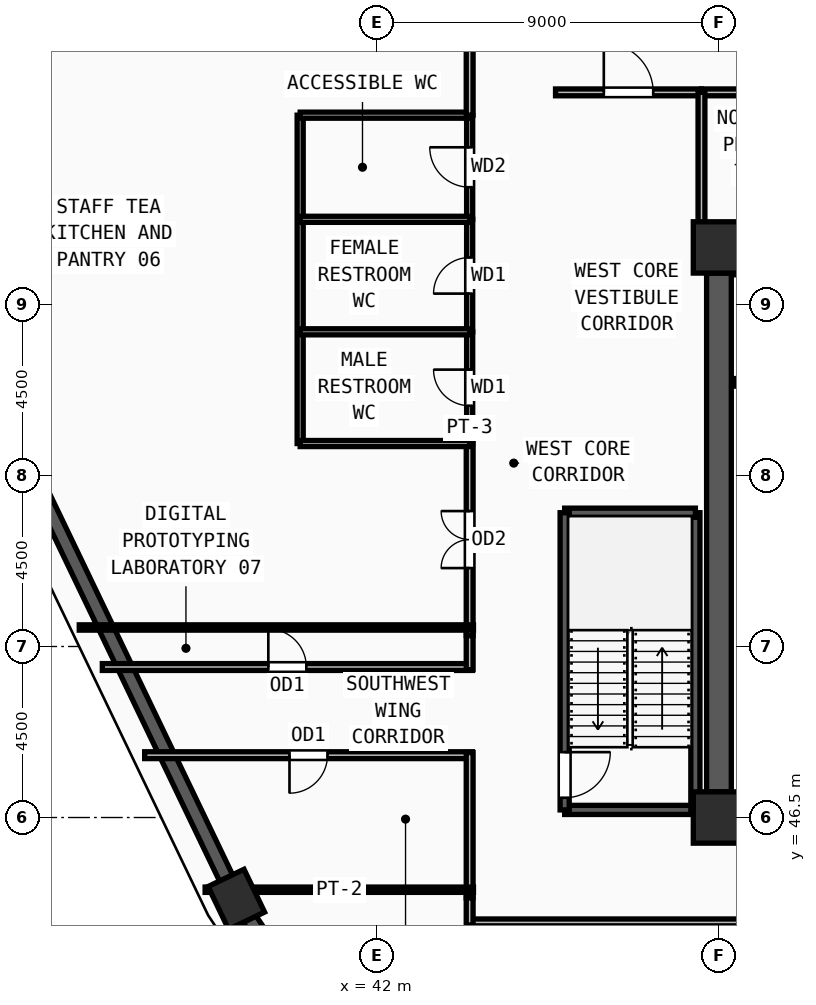
"""IFC4 building model, lengths in metres.
Left out: names, types, materials, properties, quantities, classifications, styles, units other than length and angle.
Written with IfcOpenShell. Run it as: python <this file> out.ifc"""

import sys

from ifc_helpers import new_model, si_unit, direction, frame, frame_2d, origin, origin_2d, place, context, subcontext, project, spatial, rectangle, extrude, source, transform, mapped, element, fill, save


model = new_model("IFC4")
c1 = context("Model", 3, precision=1e-05, world=origin(), true_north=direction((0.0, 1.0)))
c2 = subcontext(c1, "Body", "Model", "MODEL_VIEW")
j1 = project(units=[si_unit("LENGTHUNIT", "METRE"), si_unit("PLANEANGLEUNIT", "RADIAN")], contexts=[c1])
p1 = place(None, origin())
s1 = spatial("IfcSite", under=j1, at=p1, CompositionType="ELEMENT")
p2 = place(p1, origin())
s2 = spatial("IfcBuilding", under=s1, at=p2, CompositionType="ELEMENT")
p3 = place(p2, frame((0.0, 0.0, 236.25)))
s3 = spatial("IfcBuildingStorey", under=s2, at=p3, CompositionType="ELEMENT", Elevation=236.25)
m1 = source(origin(), c2, "Body", "SweptSolid", [
    extrude(rectangle(XDim=1.35, YDim=1.35, at=origin_2d()), origin(), (0.0, 0.0, 1.0), 3.75),
])
for number, where, z_axis, x_axis in (
    (1, (51.0, 46.5, 0.0), (0.0, 0.0, 1.0), (1.0, 0.0, 0.0)),
    (2, (51.0, 61.5, 0.0), (0.0, 0.0, 1.0), (1.0, 0.0, 0.0)),
):
    element("IfcColumn", number, at=place(p3, frame(where, z_axis=z_axis, x_axis=x_axis)), inside=s3, PredefinedType="COLUMN", context=c2, shape_type="MappedRepresentation", body=[
        mapped(m1, transform((0.0, 0.0, 0.0), x_axis=(1.0, 0.0, 0.0), y_axis=(0.0, 1.0, 0.0), z_axis=(0.0, 0.0, 1.0), scale=1.0)),
    ])
m2 = source(origin(), c2, "Body", "SweptSolid", [
    extrude(rectangle(XDim=1.25, YDim=1.05, at=origin_2d()), origin(), (0.0, 0.0, 1.0), 3.75),
])
p4 = place(p3, frame((38.3, 44.347, 0.0), z_axis=(0.0, 0.0, 1.0), x_axis=(-0.43271524133, 0.9015306539, 0.0)))
e3 = element("IfcColumn", 3, at=p4, inside=s3, PredefinedType="COLUMN", context=c2, shape_type="MappedRepresentation", body=[
    mapped(m2, transform((0.0, 0.0, 0.0), x_axis=(1.0, 0.0, 0.0), y_axis=(0.0, 1.0, 0.0), z_axis=(0.0, 0.0, 1.0), scale=1.0)),
])
p5 = place(p3, frame((27.893, 66.025, 0.0), z_axis=(0.0, 0.0, 1.0), x_axis=(0.432777471902, -0.901500781926, 0.0)))
e4 = element("IfcWall", 4, at=p5, inside=s3, PredefinedType="SOLIDWALL", context=c2, shape_type="SweptSolid", body=[
    extrude(rectangle(XDim=23.432, YDim=0.38, at=frame_2d((11.716, 0.0))), origin(), (0.0, 0.0, 1.0), 3.57),
])
m3 = source(origin(), c2, "Body", "SweptSolid", [
    extrude(rectangle(XDim=1.5, YDim=1.9, at=frame_2d((0.75, 0.95))), frame((0.0, 0.2, 0.0), z_axis=(0.0, -1.0, 0.0), x_axis=(1.0, 0.0, 0.0)), (0.0, 0.0, 1.0), 0.4),
])
p6 = place(p5, frame((5.108, 0.0, 0.55)))
e5 = element("IfcOpeningElement", 5, at=p6, cuts=e4, PredefinedType="OPENING", context=c2, shape_type="MappedRepresentation", body=[
    mapped(m3, transform((0.0, 0.0, 0.0), x_axis=(1.0, 0.0, 0.0), y_axis=(0.0, 1.0, 0.0), z_axis=(0.0, 0.0, 1.0), scale=1.0)),
])
p7 = place(p5, frame((10.966, 0.0, 0.55)))
e6 = element("IfcOpeningElement", 6, at=p7, cuts=e4, PredefinedType="OPENING", context=c2, shape_type="MappedRepresentation", body=[
    mapped(m3, transform((0.0, 0.0, 0.0), x_axis=(1.0, 0.0, 0.0), y_axis=(0.0, 1.0, 0.0), z_axis=(0.0, 0.0, 1.0), scale=1.0)),
])
p8 = place(p3, frame((38.641, 43.835, 0.0), z_axis=(0.0, 0.0, 1.0), x_axis=(0.553942197413, -0.83255512846, 0.0)))
e7 = element("IfcWall", 7, at=p8, inside=s3, PredefinedType="SOLIDWALL", context=c2, shape_type="SweptSolid", body=[
    extrude(rectangle(XDim=28.402, YDim=0.38, at=frame_2d((14.201, 0.0))), origin(), (0.0, 0.0, 1.0), 3.57),
])
p9 = place(p8, frame((6.35, 0.0, 0.55)))
e8 = element("IfcOpeningElement", 8, at=p9, cuts=e7, PredefinedType="OPENING", context=c2, shape_type="MappedRepresentation", body=[
    mapped(m3, transform((0.0, 0.0, 0.0), x_axis=(1.0, 0.0, 0.0), y_axis=(0.0, 1.0, 0.0), z_axis=(0.0, 0.0, 1.0), scale=1.0)),
])
p10 = place(p8, frame((13.451, 0.0, 0.55)))
e9 = element("IfcOpeningElement", 9, at=p10, cuts=e7, PredefinedType="OPENING", context=c2, shape_type="MappedRepresentation", body=[
    mapped(m3, transform((0.0, 0.0, 0.0), x_axis=(1.0, 0.0, 0.0), y_axis=(0.0, 1.0, 0.0), z_axis=(0.0, 0.0, 1.0), scale=1.0)),
])
p11 = place(p8, frame((20.551, 0.0, 0.55)))
e10 = element("IfcOpeningElement", 10, at=p11, cuts=e7, PredefinedType="OPENING", context=c2, shape_type="MappedRepresentation", body=[
    mapped(m3, transform((0.0, 0.0, 0.0), x_axis=(1.0, 0.0, 0.0), y_axis=(0.0, 1.0, 0.0), z_axis=(0.0, 0.0, 1.0), scale=1.0)),
])
p12 = place(p3, frame((51.0, 47.175, 0.0), z_axis=(0.0, 0.0, 1.0), x_axis=(0.0, 1.0, 0.0)))
e11 = element("IfcWall", 11, at=p12, inside=s3, PredefinedType="SHEAR", context=c2, shape_type="SweptSolid", body=[
    extrude(rectangle(XDim=13.65, YDim=0.65, at=frame_2d((6.825, 0.0))), origin(), (0.0, 0.0, 1.0), 3.57),
])
p13 = place(p3, frame((46.94, 46.7, 0.0), z_axis=(0.0, 0.0, 1.0), x_axis=(1.0, 0.0, 0.0)))
e12 = element("IfcWall", 12, at=p13, inside=s3, PredefinedType="SOLIDWALL", context=c2, shape_type="SweptSolid", body=[
    extrude(rectangle(XDim=3.44, YDim=0.24, at=frame_2d((1.72, 0.0))), origin(), (0.0, 0.0, 1.0), 3.57),
])
p14 = place(p3, frame((50.38, 46.7, 0.0), z_axis=(0.0, 0.0, 1.0), x_axis=(0.0, 1.0, 0.0)))
e13 = element("IfcWall", 13, at=p14, inside=s3, PredefinedType="SOLIDWALL", context=c2, shape_type="SweptSolid", body=[
    extrude(rectangle(XDim=7.82, YDim=0.24, at=frame_2d((3.91, 0.0))), origin(), (0.0, 0.0, 1.0), 3.57),
])
p15 = place(p3, frame((50.38, 54.52, 0.0), z_axis=(0.0, 0.0, 1.0), x_axis=(-1.0, 0.0, 0.0)))
e14 = element("IfcWall", 14, at=p15, inside=s3, PredefinedType="SOLIDWALL", context=c2, shape_type="SweptSolid", body=[
    extrude(rectangle(XDim=3.44, YDim=0.24, at=frame_2d((1.72, 0.0))), origin(), (0.0, 0.0, 1.0), 3.57),
])
p16 = place(p3, frame((46.94, 54.52, 0.0), z_axis=(0.0, 0.0, 1.0), x_axis=(0.0, -1.0, 0.0)))
e15 = element("IfcWall", 15, at=p16, inside=s3, PredefinedType="SOLIDWALL", context=c2, shape_type="SweptSolid", body=[
    extrude(rectangle(XDim=7.82, YDim=0.24, at=frame_2d((3.91, 0.0))), origin(), (0.0, 0.0, 1.0), 3.57),
])
m4 = source(origin(), c2, "Body", "SweptSolid", [
    extrude(rectangle(XDim=1.2, YDim=2.2, at=frame_2d((0.6, 1.1))), frame((0.0, 0.13, 0.0), z_axis=(0.0, -1.0, 0.0), x_axis=(1.0, 0.0, 0.0)), (0.0, 0.0, 1.0), 0.26),
])
p17 = place(p16, frame((6.3, 0.0, 0.0)))
e16 = element("IfcOpeningElement", 16, at=p17, cuts=e15, PredefinedType="OPENING", context=c2, shape_type="MappedRepresentation", body=[
    mapped(m4, transform((0.0, 0.0, 0.0), x_axis=(1.0, 0.0, 0.0), y_axis=(0.0, 1.0, 0.0), z_axis=(0.0, 0.0, 1.0), scale=1.0)),
])
for number, where, z_axis, x_axis in (
    (17, (51.4, 57.95, 0.0), (0.0, 0.0, 1.0), (1.0, 0.0, 0.0)),
    (18, (53.8, 60.88, 0.0), (0.0, 0.0, 1.0), (-1.0, 0.0, 0.0)),
):
    element("IfcWall", number, at=place(p3, frame(where, z_axis=z_axis, x_axis=x_axis)), inside=s3, PredefinedType="SOLIDWALL", context=c2, shape_type="SweptSolid", body=[
        extrude(rectangle(XDim=2.4, YDim=0.2, at=frame_2d((1.2, 0.0))), origin(), (0.0, 0.0, 1.0), 3.57),
    ])
p18 = place(p3, frame((44.44, 56.34, 0.0), z_axis=(0.0, 0.0, 1.0), x_axis=(0.0, 1.0, 0.0)))
e19 = element("IfcWall", 19, at=p18, inside=s3, PredefinedType="PARTITIONING", context=c2, shape_type="SweptSolid", body=[
    extrude(rectangle(XDim=2.94, YDim=0.16, at=frame_2d((1.47, 0.0))), origin(), (0.0, 0.0, 1.0), 3.57),
])
m5 = source(origin(), c2, "Body", "SweptSolid", [
    extrude(rectangle(XDim=0.95, YDim=2.15, at=frame_2d((0.475, 1.075))), frame((0.0, 0.09, 0.0), z_axis=(0.0, -1.0, 0.0), x_axis=(1.0, 0.0, 0.0)), (0.0, 0.0, 1.0), 0.18),
])
p19 = place(p18, frame((0.995, 0.0, 0.0)))
e20 = element("IfcOpeningElement", 20, at=p19, cuts=e19, PredefinedType="OPENING", context=c2, shape_type="MappedRepresentation", body=[
    mapped(m5, transform((0.0, 0.0, 0.0), x_axis=(1.0, 0.0, 0.0), y_axis=(0.0, 1.0, 0.0), z_axis=(0.0, 0.0, 1.0), scale=1.0)),
])
p20 = place(p3, frame((44.44, 59.28, 0.0), z_axis=(0.0, 0.0, 1.0), x_axis=(0.0, 1.0, 0.0)))
e21 = element("IfcWall", 21, at=p20, inside=s3, PredefinedType="PARTITIONING", context=c2, shape_type="SweptSolid", body=[
    extrude(rectangle(XDim=2.96, YDim=0.16, at=frame_2d((1.48, 0.0))), origin(), (0.0, 0.0, 1.0), 3.57),
])
p21 = place(p20, frame((1.005, 0.0, 0.0)))
e22 = element("IfcOpeningElement", 22, at=p21, cuts=e21, PredefinedType="OPENING", context=c2, shape_type="MappedRepresentation", body=[
    mapped(m5, transform((0.0, 0.0, 0.0), x_axis=(1.0, 0.0, 0.0), y_axis=(0.0, 1.0, 0.0), z_axis=(0.0, 0.0, 1.0), scale=1.0)),
])
p22 = place(p3, frame((44.44, 62.24, 0.0), z_axis=(0.0, 0.0, 1.0), x_axis=(0.0, 1.0, 0.0)))
e23 = element("IfcWall", 23, at=p22, inside=s3, PredefinedType="PARTITIONING", context=c2, shape_type="SweptSolid", body=[
    extrude(rectangle(XDim=2.74, YDim=0.16, at=frame_2d((1.37, 0.0))), origin(), (0.0, 0.0, 1.0), 3.57),
])
m6 = source(origin(), c2, "Body", "SweptSolid", [
    extrude(rectangle(XDim=1.05, YDim=2.15, at=frame_2d((0.525, 1.075))), frame((0.0, 0.09, 0.0), z_axis=(0.0, -1.0, 0.0), x_axis=(1.0, 0.0, 0.0)), (0.0, 0.0, 1.0), 0.18),
])
p23 = place(p22, frame((0.845, 0.0, 0.0)))
e24 = element("IfcOpeningElement", 24, at=p23, cuts=e23, PredefinedType="OPENING", context=c2, shape_type="MappedRepresentation", body=[
    mapped(m6, transform((0.0, 0.0, 0.0), x_axis=(1.0, 0.0, 0.0), y_axis=(0.0, 1.0, 0.0), z_axis=(0.0, 0.0, 1.0), scale=1.0)),
])
p24 = place(p3, frame((50.54, 65.58, 0.0), z_axis=(0.0, 0.0, 1.0), x_axis=(1.0, 0.0, 0.0)))
e25 = element("IfcWall", 25, at=p24, inside=s3, PredefinedType="PARTITIONING", context=c2, shape_type="SweptSolid", body=[
    extrude(rectangle(XDim=3.87, YDim=0.18, at=frame_2d((1.935, 0.0))), origin(), (0.0, 0.0, 1.0), 3.57),
])
m7 = source(origin(), c2, "Body", "SweptSolid", [
    extrude(rectangle(XDim=1.0, YDim=2.2, at=frame_2d((0.5, 1.1))), frame((0.0, 0.1, 0.0), z_axis=(0.0, -1.0, 0.0), x_axis=(1.0, 0.0, 0.0)), (0.0, 0.0, 1.0), 0.2),
])
p25 = place(p24, frame((1.435, 0.0, 0.0)))
e26 = element("IfcOpeningElement", 26, at=p25, cuts=e25, PredefinedType="OPENING", context=c2, shape_type="MappedRepresentation", body=[
    mapped(m7, transform((0.0, 0.0, 0.0), x_axis=(1.0, 0.0, 0.0), y_axis=(0.0, 1.0, 0.0), z_axis=(0.0, 0.0, 1.0), scale=1.0)),
])
p26 = place(p3, frame((46.7, 65.58, 0.0), z_axis=(0.0, 0.0, 1.0), x_axis=(1.0, 0.0, 0.0)))
e27 = element("IfcWall", 27, at=p26, inside=s3, PredefinedType="PARTITIONING", context=c2, shape_type="SweptSolid", body=[
    extrude(rectangle(XDim=3.84, YDim=0.18, at=frame_2d((1.92, 0.0))), origin(), (0.0, 0.0, 1.0), 3.57),
])
m8 = source(origin(), c2, "Body", "SweptSolid", [
    extrude(rectangle(XDim=1.3, YDim=2.2, at=frame_2d((0.65, 1.1))), frame((0.0, 0.1, 0.0), z_axis=(0.0, -1.0, 0.0), x_axis=(1.0, 0.0, 0.0)), (0.0, 0.0, 1.0), 0.2),
])
p27 = place(p26, frame((1.27, 0.0, 0.0)))
e28 = element("IfcOpeningElement", 28, at=p27, cuts=e27, PredefinedType="OPENING", context=c2, shape_type="MappedRepresentation", body=[
    mapped(m8, transform((0.0, 0.0, 0.0), x_axis=(1.0, 0.0, 0.0), y_axis=(0.0, 1.0, 0.0), z_axis=(0.0, 0.0, 1.0), scale=1.0)),
])
p28 = place(p3, frame((44.44, 51.285, 0.0), z_axis=(0.0, 0.0, 1.0), x_axis=(0.0, 1.0, 0.0)))
e29 = element("IfcWall", 29, at=p28, inside=s3, PredefinedType="PARTITIONING", context=c2, shape_type="SweptSolid", body=[
    extrude(rectangle(XDim=5.055, YDim=0.18, at=frame_2d((2.528, 0.0))), origin(), (0.0, 0.0, 1.0), 3.57),
])
m9 = source(origin(), c2, "Body", "SweptSolid", [
    extrude(rectangle(XDim=1.5, YDim=2.2, at=frame_2d((0.75, 1.1))), frame((0.0, 0.1, 0.0), z_axis=(0.0, -1.0, 0.0), x_axis=(1.0, 0.0, 0.0)), (0.0, 0.0, 1.0), 0.2),
])
p29 = place(p28, frame((1.778, 0.0, 0.0)))
e30 = element("IfcOpeningElement", 30, at=p29, cuts=e29, PredefinedType="OPENING", context=c2, shape_type="MappedRepresentation", body=[
    mapped(m9, transform((0.0, 0.0, 0.0), x_axis=(1.0, 0.0, 0.0), y_axis=(0.0, 1.0, 0.0), z_axis=(0.0, 0.0, 1.0), scale=1.0)),
])
p30 = place(p3, frame((34.774, 50.46, 0.0), z_axis=(0.0, 0.0, 1.0), x_axis=(1.0, 0.0, 0.0)))
e31 = element("IfcWall", 31, at=p30, inside=s3, PredefinedType="PARTITIONING", context=c2, shape_type="SweptSolid", body=[
    extrude(rectangle(XDim=9.736, YDim=0.18, at=frame_2d((4.868, 0.0))), origin(), (0.0, 0.0, 1.0), 3.57),
])
p31 = place(p30, frame((4.368, 0.0, 0.0)))
e32 = element("IfcOpeningElement", 32, at=p31, cuts=e31, PredefinedType="OPENING", context=c2, shape_type="MappedRepresentation", body=[
    mapped(m7, transform((0.0, 0.0, 0.0), x_axis=(1.0, 0.0, 0.0), y_axis=(0.0, 1.0, 0.0), z_axis=(0.0, 0.0, 1.0), scale=1.0)),
])
p32 = place(p3, frame((44.51, 48.14, 0.0), z_axis=(0.0, 0.0, 1.0), x_axis=(-1.0, 0.0, 0.0)))
e33 = element("IfcWall", 33, at=p32, inside=s3, PredefinedType="PARTITIONING", context=c2, shape_type="SweptSolid", body=[
    extrude(rectangle(XDim=8.622, YDim=0.18, at=frame_2d((4.311, 0.0))), origin(), (0.0, 0.0, 1.0), 3.57),
])
p33 = place(p32, frame((3.811, 0.0, 0.0)))
e34 = element("IfcOpeningElement", 34, at=p33, cuts=e33, PredefinedType="OPENING", context=c2, shape_type="MappedRepresentation", body=[
    mapped(m7, transform((0.0, 0.0, 0.0), x_axis=(1.0, 0.0, 0.0), y_axis=(0.0, 1.0, 0.0), z_axis=(0.0, 0.0, 1.0), scale=1.0)),
])
p34 = place(p3, frame((75.63, 43.74, 0.0), z_axis=(0.0, 0.0, 1.0), x_axis=(-1.0, 0.0, 0.0)))
e35 = element("IfcWall", 35, at=p34, inside=s3, PredefinedType="PARTITIONING", context=c2, shape_type="SweptSolid", body=[
    extrude(rectangle(XDim=31.26, YDim=0.18, at=frame_2d((15.63, 0.0))), origin(), (0.0, 0.0, 1.0), 3.57),
])
p35 = place(p34, frame((10.38, 0.0, 0.0)))
e36 = element("IfcOpeningElement", 36, at=p35, cuts=e35, PredefinedType="OPENING", context=c2, shape_type="MappedRepresentation", body=[
    mapped(m9, transform((0.0, 0.0, 0.0), x_axis=(1.0, 0.0, 0.0), y_axis=(0.0, 1.0, 0.0), z_axis=(0.0, 0.0, 1.0), scale=1.0)),
])
p36 = place(p3, frame((39.98, 56.34, 0.0), z_axis=(0.0, 0.0, 1.0), x_axis=(0.0, 1.0, 0.0)))
e37 = element("IfcWall", 37, at=p36, inside=s3, PredefinedType="PARTITIONING", context=c2, shape_type="SweptSolid", body=[
    extrude(rectangle(XDim=8.64, YDim=0.16, at=frame_2d((4.32, 0.0))), origin(), (0.0, 0.0, 1.0), 3.57),
])
for number, where, z_axis, x_axis in (
    (38, (39.98, 56.34, 0.0), (0.0, 0.0, 1.0), (1.0, 0.0, 0.0)),
    (39, (39.98, 59.28, 0.0), (0.0, 0.0, 1.0), (1.0, 0.0, 0.0)),
    (40, (39.98, 62.24, 0.0), (0.0, 0.0, 1.0), (1.0, 0.0, 0.0)),
    (41, (39.98, 64.98, 0.0), (0.0, 0.0, 1.0), (1.0, 0.0, 0.0)),
):
    element("IfcWall", number, at=place(p3, frame(where, z_axis=z_axis, x_axis=x_axis)), inside=s3, PredefinedType="PARTITIONING", context=c2, shape_type="SweptSolid", body=[
        extrude(rectangle(XDim=4.46, YDim=0.16, at=frame_2d((2.23, 0.0))), origin(), (0.0, 0.0, 1.0), 3.57),
    ])
p37 = place(p3, frame((50.54, 61.95, 0.0), z_axis=(0.0, 0.0, 1.0), x_axis=(0.0, 1.0, 0.0)))
e42 = element("IfcWall", 42, at=p37, inside=s3, PredefinedType="PARTITIONING", context=c2, shape_type="SweptSolid", body=[
    extrude(rectangle(XDim=3.63, YDim=0.18, at=frame_2d((1.815, 0.0))), origin(), (0.0, 0.0, 1.0), 3.57),
])
p38 = place(p3, frame((44.44, 64.98, 0.0), z_axis=(0.0, 0.0, 1.0), x_axis=(0.0, 1.0, 0.0)))
e43 = element("IfcWall", 43, at=p38, inside=s3, PredefinedType="PARTITIONING", context=c2, shape_type="SweptSolid", body=[
    extrude(rectangle(XDim=1.805, YDim=0.18, at=frame_2d((0.902, 0.0))), origin(), (0.0, 0.0, 1.0), 3.57),
])
p39 = place(p3, frame((44.44, 50.39, 0.0), z_axis=(0.0, 0.0, 1.0), x_axis=(0.0, 1.0, 0.0)))
e44 = element("IfcWall", 44, at=p39, inside=s3, PredefinedType="PARTITIONING", context=c2, shape_type="SweptSolid", body=[
    extrude(rectangle(XDim=0.895, YDim=0.18, at=frame_2d((0.448, 0.0))), origin(), (0.0, 0.0, 1.0), 3.205),
])
p40 = place(p3, frame((44.44, 44.385, 0.0), z_axis=(0.0, 0.0, 1.0), x_axis=(0.0, 1.0, 0.0)))
e45 = element("IfcWall", 45, at=p40, inside=s3, PredefinedType="PARTITIONING", context=c2, shape_type="SweptSolid", body=[
    extrude(rectangle(XDim=3.825, YDim=0.18, at=frame_2d((1.913, 0.0))), origin(), (0.0, 0.0, 1.0), 3.57),
])
p41 = place(p3, frame((44.44, 43.67, 0.0), z_axis=(0.0, 0.0, 1.0), x_axis=(0.0, 1.0, 0.0)))
e46 = element("IfcWall", 46, at=p41, inside=s3, PredefinedType="PARTITIONING", context=c2, shape_type="SweptSolid", body=[
    extrude(rectangle(XDim=0.715, YDim=0.18, at=frame_2d((0.357, 0.0))), origin(), (0.0, 0.0, 1.0), 3.57),
])
p42 = place(p3, frame((44.54, 44.6, 0.0), z_axis=(0.0, 0.0, 1.0), x_axis=(-1.0, 0.0, 0.0)))
e47 = element("IfcWall", 47, at=p42, inside=s3, PredefinedType="PARTITIONING", context=c2, shape_type="SweptSolid", body=[
    extrude(rectangle(XDim=7.061, YDim=0.14, at=frame_2d((3.531, 0.0))), origin(), (0.0, 0.0, 1.0), 3.57),
])
p43 = place(p3, frame((44.54, 51.5, 0.0), z_axis=(0.0, 0.0, 1.0), x_axis=(-1.0, 0.0, 0.0)))
e48 = element("IfcWall", 48, at=p43, inside=s3, PredefinedType="PARTITIONING", context=c2, shape_type="SweptSolid", body=[
    extrude(rectangle(XDim=10.373, YDim=0.14, at=frame_2d((5.187, 0.0))), origin(), (0.0, 0.0, 1.0), 3.57),
])
m10 = source(origin(), c2, "Body", "SweptSolid", [
    extrude(rectangle(XDim=1.2, YDim=2.2, at=frame_2d((0.6, 1.1))), frame((0.0, 0.025, 0.0), z_axis=(0.0, -1.0, 0.0), x_axis=(1.0, 0.0, 0.0)), (0.0, 0.0, 1.0), 0.05),
])
p44 = place(p17, origin())
e49 = element("IfcDoor", 49, at=p44, inside=s3, OperationType="SINGLE_SWING_LEFT", PredefinedType="DOOR", context=c2, shape_type="MappedRepresentation", body=[
    mapped(m10, transform((0.0, 0.0, 0.0), x_axis=(1.0, 0.0, 0.0), y_axis=(0.0, 1.0, 0.0), z_axis=(0.0, 0.0, 1.0), scale=1.0)),
])
fill(e16, e49)
m11 = source(origin(), c2, "Body", "SweptSolid", [
    extrude(rectangle(XDim=0.95, YDim=2.15, at=frame_2d((0.475, 1.075))), frame((0.0, 0.025, 0.0), z_axis=(0.0, -1.0, 0.0), x_axis=(1.0, 0.0, 0.0)), (0.0, 0.0, 1.0), 0.05),
])
p45 = place(p19, origin())
e50 = element("IfcDoor", 50, at=p45, inside=s3, OperationType="SINGLE_SWING_RIGHT", PredefinedType="DOOR", context=c2, shape_type="MappedRepresentation", body=[
    mapped(m11, transform((0.0, 0.0, 0.0), x_axis=(1.0, 0.0, 0.0), y_axis=(0.0, 1.0, 0.0), z_axis=(0.0, 0.0, 1.0), scale=1.0)),
])
fill(e20, e50)
p46 = place(p21, origin())
e51 = element("IfcDoor", 51, at=p46, inside=s3, OperationType="SINGLE_SWING_LEFT", PredefinedType="DOOR", context=c2, shape_type="MappedRepresentation", body=[
    mapped(m11, transform((0.0, 0.0, 0.0), x_axis=(1.0, 0.0, 0.0), y_axis=(0.0, 1.0, 0.0), z_axis=(0.0, 0.0, 1.0), scale=1.0)),
])
fill(e22, e51)
m12 = source(origin(), c2, "Body", "SweptSolid", [
    extrude(rectangle(XDim=1.05, YDim=2.15, at=frame_2d((0.525, 1.075))), frame((0.0, 0.025, 0.0), z_axis=(0.0, -1.0, 0.0), x_axis=(1.0, 0.0, 0.0)), (0.0, 0.0, 1.0), 0.05),
])
p47 = place(p23, origin())
e52 = element("IfcDoor", 52, at=p47, inside=s3, OperationType="SINGLE_SWING_RIGHT", PredefinedType="DOOR", context=c2, shape_type="MappedRepresentation", body=[
    mapped(m12, transform((0.0, 0.0, 0.0), x_axis=(1.0, 0.0, 0.0), y_axis=(0.0, 1.0, 0.0), z_axis=(0.0, 0.0, 1.0), scale=1.0)),
])
fill(e24, e52)
m13 = source(origin(), c2, "Body", "SweptSolid", [
    extrude(rectangle(XDim=1.3, YDim=2.2, at=frame_2d((0.65, 1.1))), frame((0.0, 0.025, 0.0), z_axis=(0.0, -1.0, 0.0), x_axis=(1.0, 0.0, 0.0)), (0.0, 0.0, 1.0), 0.05),
])
p48 = place(p27, origin())
e53 = element("IfcDoor", 53, at=p48, inside=s3, OperationType="SINGLE_SWING_LEFT", PredefinedType="DOOR", context=c2, shape_type="MappedRepresentation", body=[
    mapped(m13, transform((0.0, 0.0, 0.0), x_axis=(1.0, 0.0, 0.0), y_axis=(0.0, 1.0, 0.0), z_axis=(0.0, 0.0, 1.0), scale=1.0)),
])
fill(e28, e53)
m14 = source(origin(), c2, "Body", "SweptSolid", [
    extrude(rectangle(XDim=1.5, YDim=2.2, at=frame_2d((0.75, 1.1))), frame((0.0, 0.025, 0.0), z_axis=(0.0, -1.0, 0.0), x_axis=(1.0, 0.0, 0.0)), (0.0, 0.0, 1.0), 0.05),
])
p49 = place(p29, origin())
e54 = element("IfcDoor", 54, at=p49, inside=s3, OperationType="DOUBLE_DOOR_SINGLE_SWING", PredefinedType="DOOR", context=c2, shape_type="MappedRepresentation", body=[
    mapped(m14, transform((0.0, 0.0, 0.0), x_axis=(1.0, 0.0, 0.0), y_axis=(0.0, 1.0, 0.0), z_axis=(0.0, 0.0, 1.0), scale=1.0)),
])
fill(e30, e54)
m15 = source(origin(), c2, "Body", "SweptSolid", [
    extrude(rectangle(XDim=1.0, YDim=2.2, at=frame_2d((0.5, 1.1))), frame((0.0, 0.025, 0.0), z_axis=(0.0, -1.0, 0.0), x_axis=(1.0, 0.0, 0.0)), (0.0, 0.0, 1.0), 0.05),
])
p50 = place(p31, origin())
e55 = element("IfcDoor", 55, at=p50, inside=s3, OperationType="SINGLE_SWING_LEFT", PredefinedType="DOOR", context=c2, shape_type="MappedRepresentation", body=[
    mapped(m15, transform((0.0, 0.0, 0.0), x_axis=(1.0, 0.0, 0.0), y_axis=(0.0, 1.0, 0.0), z_axis=(0.0, 0.0, 1.0), scale=1.0)),
])
fill(e32, e55)
p51 = place(p33, origin())
e56 = element("IfcDoor", 56, at=p51, inside=s3, OperationType="SINGLE_SWING_RIGHT", PredefinedType="DOOR", context=c2, shape_type="MappedRepresentation", body=[
    mapped(m15, transform((0.0, 0.0, 0.0), x_axis=(1.0, 0.0, 0.0), y_axis=(0.0, 1.0, 0.0), z_axis=(0.0, 0.0, 1.0), scale=1.0)),
])
fill(e34, e56)
save(model, sys.argv[1])
